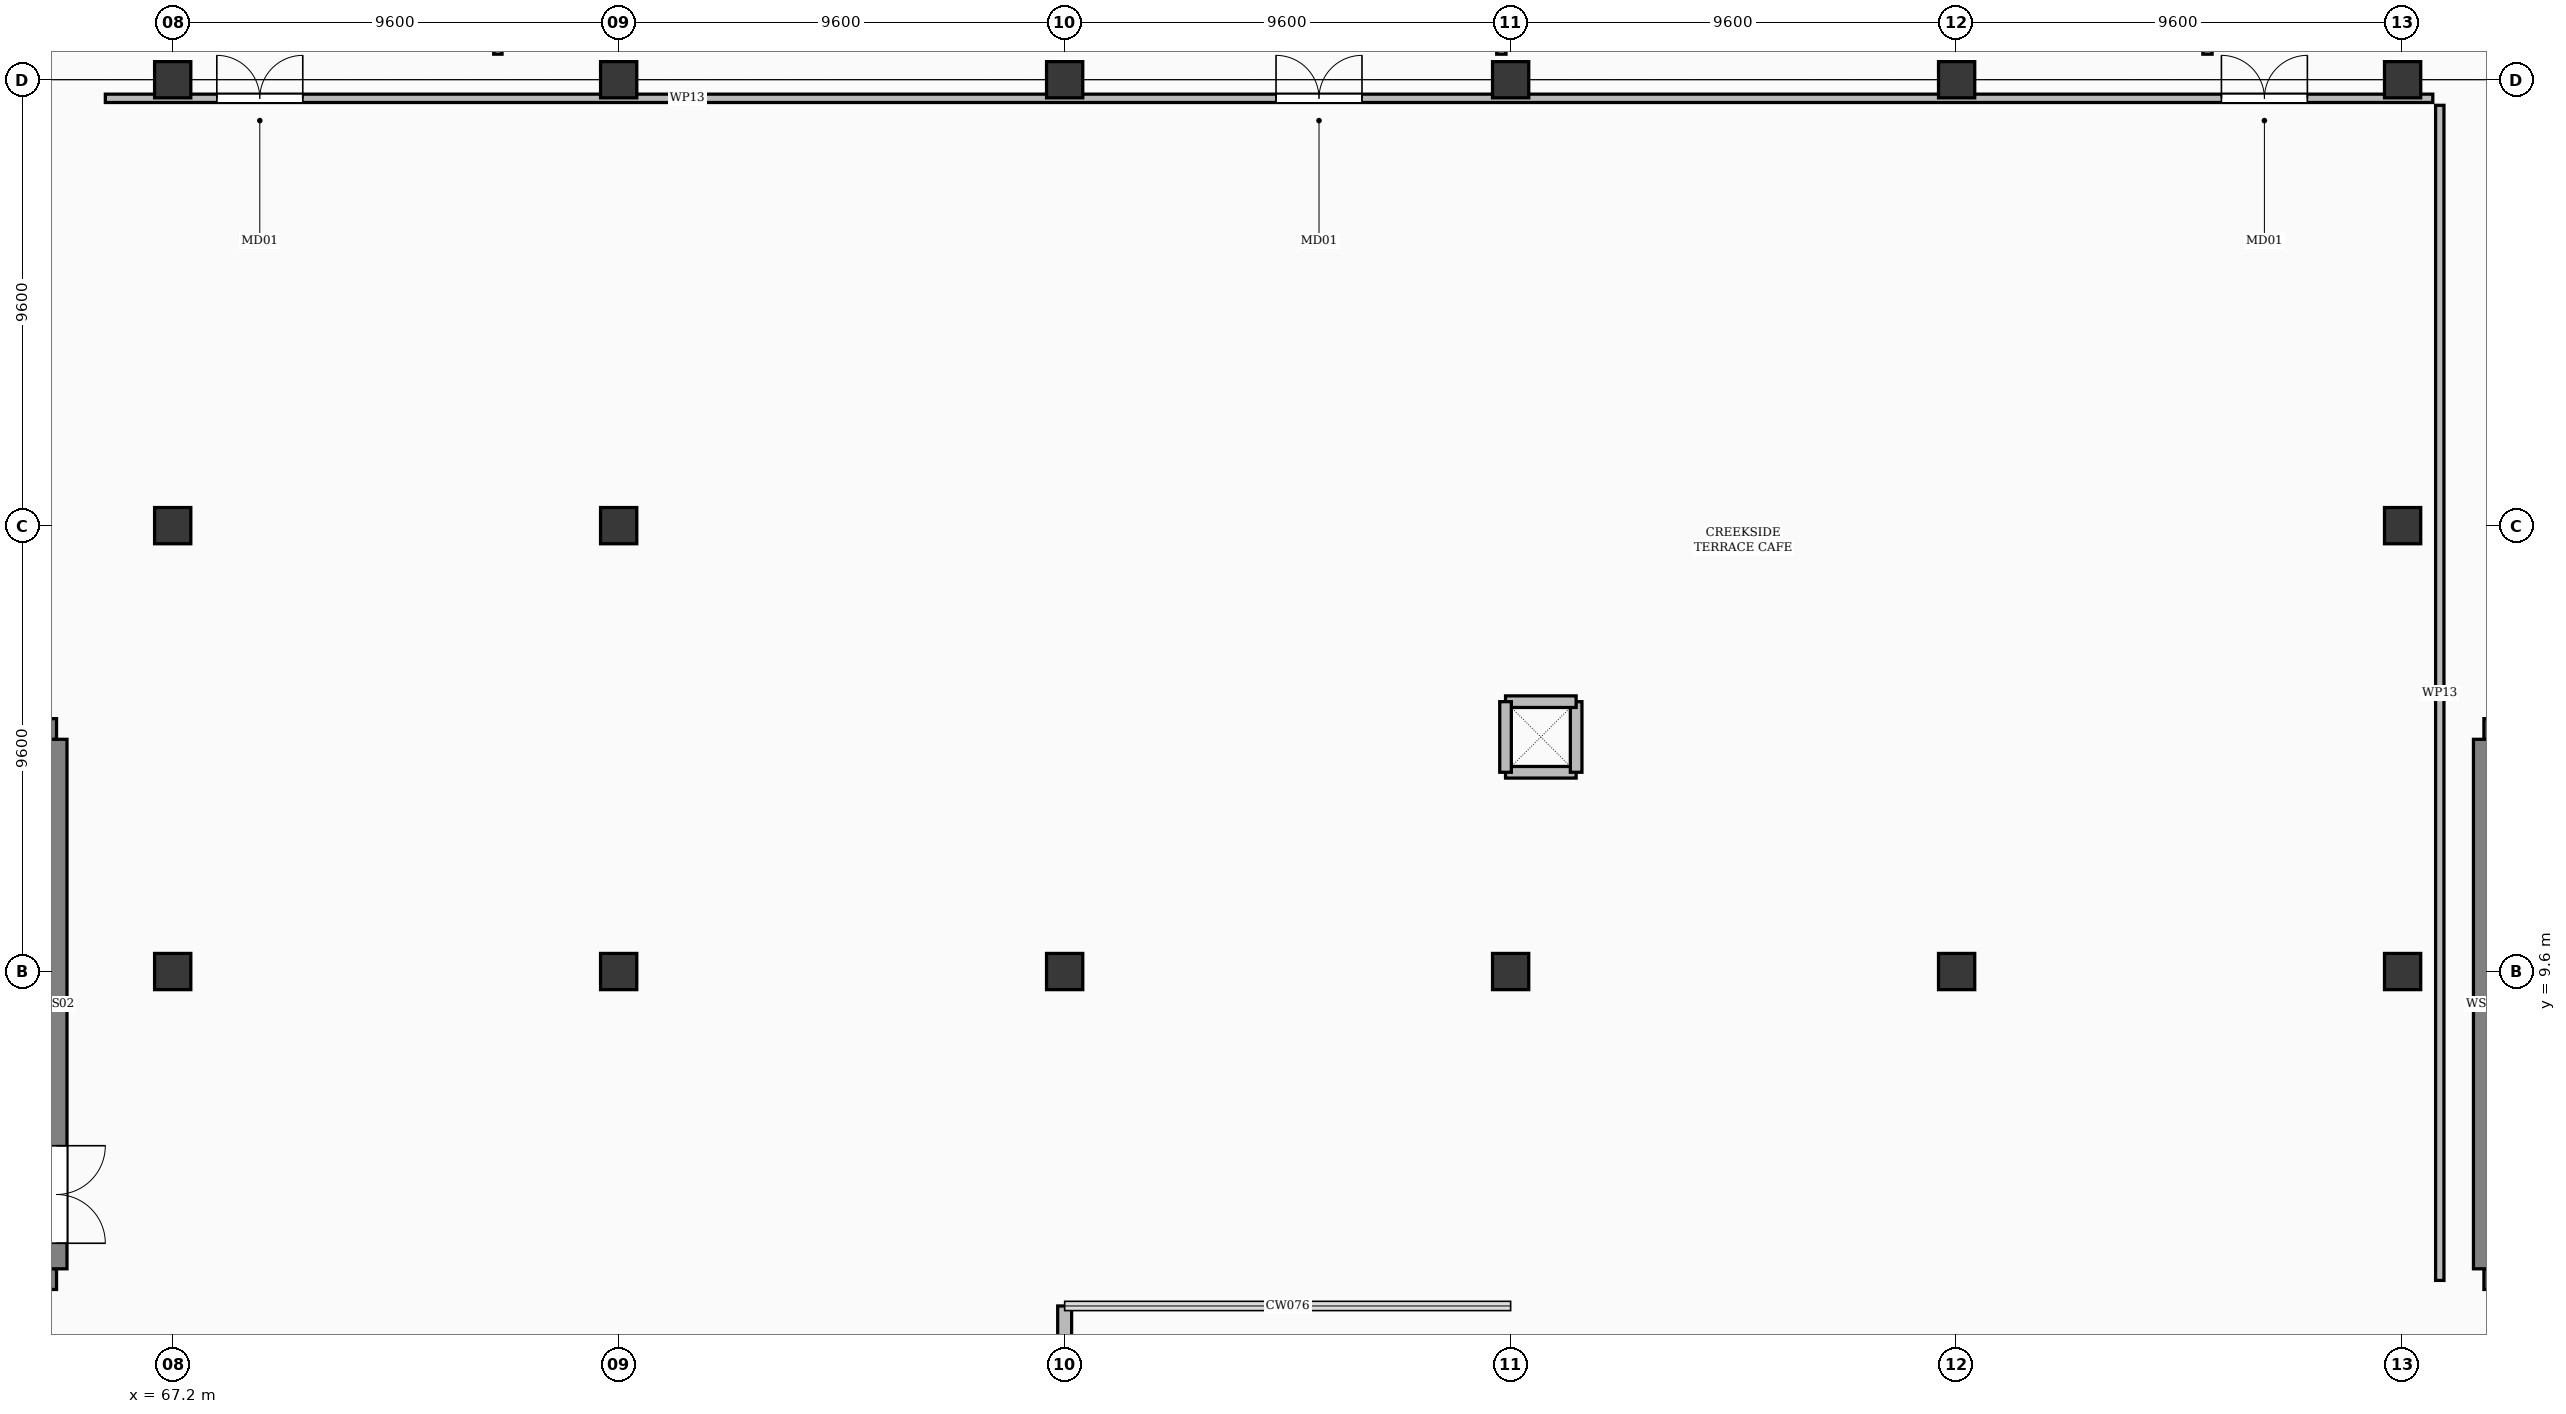
"""IFC4 building model, lengths in metres.
Left out: names, types, materials, properties, quantities, classifications, styles, units other than length and angle.
Written with IfcOpenShell. Run it as: python <this file> out.ifc"""

import sys

from ifc_helpers import new_model, si_unit, direction, frame, frame_2d, origin, origin_2d, place, context, subcontext, project, spatial, rectangle, extrude, element, fill, save


model = new_model("IFC4")
c1 = context("Model", 3, precision=1e-05, world=origin(), true_north=direction((0.0, 1.0)))
c2 = subcontext(c1, "Body", "Model", "MODEL_VIEW")
j1 = project(units=[si_unit("LENGTHUNIT", "METRE"), si_unit("PLANEANGLEUNIT", "RADIAN")], contexts=[c1])
p1 = place(None, origin())
s1 = spatial("IfcSite", under=j1, at=p1, CompositionType="ELEMENT")
p2 = place(p1, origin())
s2 = spatial("IfcBuilding", under=s1, at=p2, CompositionType="ELEMENT")
p3 = place(p2, frame((0.0, 0.0, 6.0)))
s3 = spatial("IfcBuildingStorey", under=s2, at=p3, CompositionType="ELEMENT", Elevation=6.0)
for number, where, z_axis, x_axis in (
    (1, (67.2, 9.6, 0.0), (0.0, 0.0, 1.0), (1.0, 0.0, 0.0)),
    (2, (67.2, 19.2, 0.0), (0.0, 0.0, 1.0), (1.0, 0.0, 0.0)),
    (3, (67.2, 28.8, 0.0), (0.0, 0.0, 1.0), (1.0, 0.0, 0.0)),
    (4, (76.8, 9.6, 0.0), (0.0, 0.0, 1.0), (1.0, 0.0, 0.0)),
    (5, (76.8, 19.2, 0.0), (0.0, 0.0, 1.0), (1.0, 0.0, 0.0)),
    (6, (76.8, 28.8, 0.0), (0.0, 0.0, 1.0), (1.0, 0.0, 0.0)),
    (7, (86.4, 9.6, 0.0), (0.0, 0.0, 1.0), (1.0, 0.0, 0.0)),
    (8, (86.4, 28.8, 0.0), (0.0, 0.0, 1.0), (1.0, 0.0, 0.0)),
    (9, (96.0, 9.6, 0.0), (0.0, 0.0, 1.0), (1.0, 0.0, 0.0)),
    (10, (96.0, 28.8, 0.0), (0.0, 0.0, 1.0), (1.0, 0.0, 0.0)),
    (11, (105.6, 9.6, 0.0), (0.0, 0.0, 1.0), (1.0, 0.0, 0.0)),
    (12, (105.6, 28.8, 0.0), (0.0, 0.0, 1.0), (1.0, 0.0, 0.0)),
    (13, (115.2, 9.6, 0.0), (0.0, 0.0, 1.0), (1.0, 0.0, 0.0)),
    (14, (115.2, 19.2, 0.0), (0.0, 0.0, 1.0), (1.0, 0.0, 0.0)),
    (15, (115.2, 28.8, 0.0), (0.0, 0.0, 1.0), (1.0, 0.0, 0.0)),
):
    element("IfcColumn", number, at=place(p3, frame(where, z_axis=z_axis, x_axis=x_axis)), inside=s3, PredefinedType="COLUMN", context=c2, shape_type="SweptSolid", body=[
        extrude(rectangle(XDim=0.78, YDim=0.78, at=origin_2d()), origin(), (0.0, 0.0, 1.0), 5.4),
    ])
p4 = place(p3, frame((86.4, 2.4, 0.0), z_axis=(0.0, 0.0, 1.0), x_axis=(0.0, -1.0, 0.0)))
e16 = element("IfcWall", 16, at=p4, inside=s3, PredefinedType="SOLIDWALL", context=c2, shape_type="SweptSolid", body=[
    extrude(rectangle(XDim=2.35, YDim=0.3, at=frame_2d((1.175, 0.0))), origin(), (0.0, 0.0, 1.0), 4.312),
])
for number, where, z_axis, x_axis in (
    (17, (59.55, 2.98, 0.0), (0.0, 0.0, 1.0), (1.0, 0.0, 0.0)),
    (18, (59.55, 14.82, 0.0), (0.0, 0.0, 1.0), (1.0, 0.0, 0.0)),
):
    element("IfcWall", number, at=place(p3, frame(where, z_axis=z_axis, x_axis=x_axis)), inside=s3, PredefinedType="SHEAR", context=c2, shape_type="SweptSolid", body=[
        extrude(rectangle(XDim=5.15, YDim=0.45, at=frame_2d((2.575, 0.0))), origin(), (0.0, 0.0, 1.0), 5.1),
    ])
p5 = place(p3, frame((64.7, 3.2, 0.0), z_axis=(0.0, 0.0, 1.0), x_axis=(0.0, 1.0, 0.0)))
e19 = element("IfcWall", 19, at=p5, inside=s3, PredefinedType="SHEAR", context=c2, shape_type="SweptSolid", body=[
    extrude(rectangle(XDim=11.4, YDim=0.45, at=frame_2d((5.7, 0.0))), origin(), (0.0, 0.0, 1.0), 5.1),
])
p6 = place(p5, frame((0.55, 0.0, 0.0)))
e20 = element("IfcOpeningElement", 20, at=p6, cuts=e19, PredefinedType="OPENING", context=c2, shape_type="SweptSolid", body=[
    extrude(rectangle(XDim=2.1, YDim=2.2, at=frame_2d((1.05, 1.1))), frame((0.0, 0.237, 0.0), z_axis=(0.0, -1.0, 0.0), x_axis=(1.0, 0.0, 0.0)), (0.0, 0.0, 1.0), 0.474),
])
for number, where, z_axis, x_axis in (
    (21, (116.95, 2.98, 0.0), (0.0, 0.0, 1.0), (1.0, 0.0, 0.0)),
    (22, (116.95, 14.82, 0.0), (0.0, 0.0, 1.0), (1.0, 0.0, 0.0)),
):
    element("IfcWall", number, at=place(p3, frame(where, z_axis=z_axis, x_axis=x_axis)), inside=s3, PredefinedType="SHEAR", context=c2, shape_type="SweptSolid", body=[
        extrude(rectangle(XDim=5.15, YDim=0.45, at=frame_2d((2.575, 0.0))), origin(), (0.0, 0.0, 1.0), 5.1),
    ])
p7 = place(p3, frame((116.95, 3.2, 0.0), z_axis=(0.0, 0.0, 1.0), x_axis=(0.0, 1.0, 0.0)))
e23 = element("IfcWall", 23, at=p7, inside=s3, PredefinedType="SHEAR", context=c2, shape_type="SweptSolid", body=[
    extrude(rectangle(XDim=11.4, YDim=0.45, at=frame_2d((5.7, 0.0))), origin(), (0.0, 0.0, 1.0), 5.1),
])
for number, where, z_axis, x_axis in (
    (24, (95.89, 13.89, 0.0), (0.0, 0.0, 1.0), (1.0, 0.0, 0.0)),
    (25, (97.41, 13.89, 0.0), (0.0, 0.0, 1.0), (0.0, 1.0, 0.0)),
    (26, (97.41, 15.41, 0.0), (0.0, 0.0, 1.0), (-1.0, 0.0, 0.0)),
    (27, (95.89, 15.41, 0.0), (0.0, 0.0, 1.0), (0.0, -1.0, 0.0)),
):
    element("IfcWall", number, at=place(p3, frame(where, z_axis=z_axis, x_axis=x_axis)), inside=s3, PredefinedType="SOLIDWALL", context=c2, shape_type="SweptSolid", body=[
        extrude(rectangle(XDim=1.52, YDim=0.25, at=frame_2d((0.76, 0.0))), origin(), (0.0, 0.0, 1.0), 5.1),
    ])
p8 = place(p3, frame((74.2, 29.35, 0.0), z_axis=(0.0, 0.0, 1.0), x_axis=(0.0, 1.0, 0.0)))
e28 = element("IfcWall", 28, at=p8, inside=s3, PredefinedType="PARTITIONING", context=c2, shape_type="SweptSolid", body=[
    extrude(rectangle(XDim=13.5, YDim=0.18, at=frame_2d((6.75, 0.0))), origin(), (0.0, 0.0, 1.0), 4.312),
])
p9 = place(p8, frame((2.2, 0.0, 0.0)))
e29 = element("IfcOpeningElement", 29, at=p9, cuts=e28, PredefinedType="OPENING", context=c2, shape_type="SweptSolid", body=[
    extrude(rectangle(XDim=1.85, YDim=2.35, at=frame_2d((0.925, 1.175))), frame((0.0, 0.102, 0.0), z_axis=(0.0, -1.0, 0.0), x_axis=(1.0, 0.0, 0.0)), (0.0, 0.0, 1.0), 0.204),
])
p10 = place(p8, frame((9.3, 0.0, 0.0)))
e30 = element("IfcOpeningElement", 30, at=p10, cuts=e28, PredefinedType="OPENING", context=c2, shape_type="SweptSolid", body=[
    extrude(rectangle(XDim=1.85, YDim=2.35, at=frame_2d((0.925, 1.175))), frame((0.0, 0.102, 0.0), z_axis=(0.0, -1.0, 0.0), x_axis=(1.0, 0.0, 0.0)), (0.0, 0.0, 1.0), 0.204),
])
for number, where, z_axis, x_axis in (
    (31, (95.8, 29.35, 0.0), (0.0, 0.0, 1.0), (0.0, 1.0, 0.0)),
    (32, (111.0, 29.35, 0.0), (0.0, 0.0, 1.0), (0.0, 1.0, 0.0)),
):
    element("IfcWall", number, at=place(p3, frame(where, z_axis=z_axis, x_axis=x_axis)), inside=s3, PredefinedType="PARTITIONING", context=c2, shape_type="SweptSolid", body=[
        extrude(rectangle(XDim=11.1, YDim=0.2, at=frame_2d((5.55, 0.0))), origin(), (0.0, 0.0, 1.0), 4.312),
    ])
p11 = place(p3, frame((65.75, 28.4, 0.0), z_axis=(0.0, 0.0, 1.0), x_axis=(1.0, 0.0, 0.0)))
e33 = element("IfcWall", 33, at=p11, inside=s3, PredefinedType="PARTITIONING", context=c2, shape_type="SweptSolid", body=[
    extrude(rectangle(XDim=50.1, YDim=0.18, at=frame_2d((25.05, 0.0))), origin(), (0.0, 0.0, 1.0), 3.692),
])
p12 = place(p11, frame((2.4, 0.0, 0.0)))
e34 = element("IfcOpeningElement", 34, at=p12, cuts=e33, PredefinedType="OPENING", context=c2, shape_type="SweptSolid", body=[
    extrude(rectangle(XDim=1.85, YDim=2.35, at=frame_2d((0.925, 1.175))), frame((0.0, 0.102, 0.0), z_axis=(0.0, -1.0, 0.0), x_axis=(1.0, 0.0, 0.0)), (0.0, 0.0, 1.0), 0.204),
])
p13 = place(p11, frame((45.55, 0.0, 0.0)))
e35 = element("IfcOpeningElement", 35, at=p13, cuts=e33, PredefinedType="OPENING", context=c2, shape_type="SweptSolid", body=[
    extrude(rectangle(XDim=1.85, YDim=2.35, at=frame_2d((0.925, 1.175))), frame((0.0, 0.102, 0.0), z_axis=(0.0, -1.0, 0.0), x_axis=(1.0, 0.0, 0.0)), (0.0, 0.0, 1.0), 0.204),
])
p14 = place(p11, frame((25.2, 0.0, 0.0)))
e36 = element("IfcOpeningElement", 36, at=p14, cuts=e33, PredefinedType="OPENING", context=c2, shape_type="SweptSolid", body=[
    extrude(rectangle(XDim=1.85, YDim=2.35, at=frame_2d((0.925, 1.175))), frame((0.0, 0.102, 0.0), z_axis=(0.0, -1.0, 0.0), x_axis=(1.0, 0.0, 0.0)), (0.0, 0.0, 1.0), 0.204),
])
p15 = place(p3, frame((116.0, 2.95, 0.0), z_axis=(0.0, 0.0, 1.0), x_axis=(0.0, 1.0, 0.0)))
e37 = element("IfcWall", 37, at=p15, inside=s3, PredefinedType="PARTITIONING", context=c2, shape_type="SweptSolid", body=[
    extrude(rectangle(XDim=25.3, YDim=0.18, at=frame_2d((12.65, 0.0))), origin(), (0.0, 0.0, 1.0), 4.312),
])
p16 = place(p6, frame((2.1, 0.0, 0.0), z_axis=(0.0, 0.0, 1.0), x_axis=(-1.0, 0.0, 0.0)))
e38 = element("IfcDoor", 38, at=p16, inside=s3, OperationType="DOUBLE_DOOR_SINGLE_SWING", PredefinedType="DOOR", context=c2, shape_type="SweptSolid", body=[
    extrude(rectangle(XDim=2.1, YDim=2.2, at=frame_2d((1.05, 1.1))), frame((0.0, 0.025, 0.0), z_axis=(0.0, -1.0, 0.0), x_axis=(1.0, 0.0, 0.0)), (0.0, 0.0, 1.0), 0.05),
])
fill(e20, e38)
p17 = place(p12, origin())
e39 = element("IfcDoor", 39, at=p17, inside=s3, OperationType="DOUBLE_DOOR_SINGLE_SWING", PredefinedType="DOOR", context=c2, shape_type="SweptSolid", body=[
    extrude(rectangle(XDim=1.85, YDim=2.35, at=frame_2d((0.925, 1.175))), frame((0.0, 0.025, 0.0), z_axis=(0.0, -1.0, 0.0), x_axis=(1.0, 0.0, 0.0)), (0.0, 0.0, 1.0), 0.05),
])
fill(e34, e39)
p18 = place(p13, origin())
e40 = element("IfcDoor", 40, at=p18, inside=s3, OperationType="DOUBLE_DOOR_SINGLE_SWING", PredefinedType="DOOR", context=c2, shape_type="SweptSolid", body=[
    extrude(rectangle(XDim=1.85, YDim=2.35, at=frame_2d((0.925, 1.175))), frame((0.0, 0.025, 0.0), z_axis=(0.0, -1.0, 0.0), x_axis=(1.0, 0.0, 0.0)), (0.0, 0.0, 1.0), 0.05),
])
fill(e35, e40)
p19 = place(p14, origin())
e41 = element("IfcDoor", 41, at=p19, inside=s3, OperationType="DOUBLE_DOOR_SINGLE_SWING", PredefinedType="DOOR", context=c2, shape_type="SweptSolid", body=[
    extrude(rectangle(XDim=1.85, YDim=2.35, at=frame_2d((0.925, 1.175))), frame((0.0, 0.025, 0.0), z_axis=(0.0, -1.0, 0.0), x_axis=(1.0, 0.0, 0.0)), (0.0, 0.0, 1.0), 0.05),
])
fill(e36, e41)
save(model, sys.argv[1])
